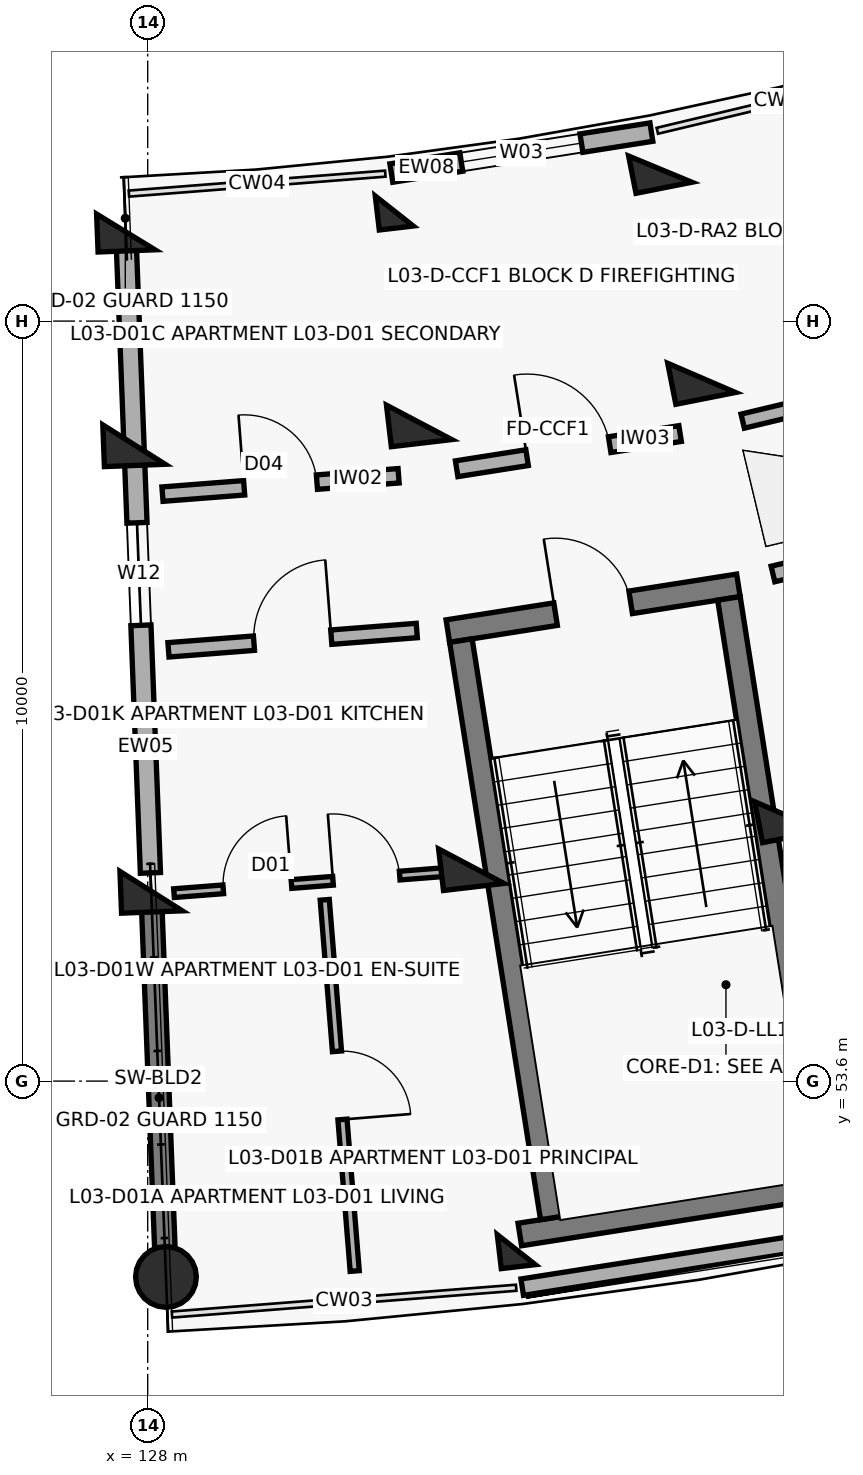
"""IFC4 building model, lengths in metres.
Left out: names, types, materials, properties, quantities, classifications, styles, units other than length and angle.
Written with IfcOpenShell. Run it as: python <this file> out.ifc"""

import sys

from ifc_helpers import new_model, si_unit, direction, frame, frame_2d, origin, origin_2d, place, context, subcontext, project, spatial, rectangle, circle, extrude, element, fill, save


model = new_model("IFC4")
c1 = context("Model", 3, precision=1e-05, world=origin(), true_north=direction((0.0, 1.0)))
c2 = subcontext(c1, "Body", "Model", "MODEL_VIEW")
j1 = project(units=[si_unit("LENGTHUNIT", "METRE"), si_unit("PLANEANGLEUNIT", "RADIAN")], contexts=[c1])
p1 = place(None, origin())
s1 = spatial("IfcSite", under=j1, at=p1, CompositionType="ELEMENT")
p2 = place(p1, origin())
s2 = spatial("IfcBuilding", under=s1, at=p2, CompositionType="ELEMENT")
p3 = place(p2, frame((0.0, 0.0, 11.2)))
s3 = spatial("IfcBuildingStorey", under=s2, at=p3, CompositionType="ELEMENT", Elevation=11.2)
p4 = place(p3, frame((127.712, 64.773, 0.0), z_axis=(0.0, 0.0, 1.0), x_axis=(0.038387809088, -0.999262916411, 0.0)))
e1 = element("IfcColumn", 1, at=p4, inside=s3, PredefinedType="COLUMN", context=c2, shape_type="SweptSolid", body=[
    extrude(rectangle(XDim=0.5, YDim=0.75, at=origin_2d()), origin(), (0.0, 0.0, 1.0), 3.1),
])
for number, where, z_axis, x_axis in (
    (2, (127.82, 61.975, 0.0), (0.0, 0.0, 1.0), (0.038, -0.999, 0.0)),
    (3, (128.045, 56.1, 0.0), (0.0, 0.0, 1.0), (0.038, -0.999, 0.0)),
):
    element("IfcColumn", number, at=place(p3, frame(where, z_axis=z_axis, x_axis=x_axis)), inside=s3, PredefinedType="COLUMN", context=c2, shape_type="SweptSolid", body=[
        extrude(rectangle(XDim=0.55, YDim=0.8, at=origin_2d()), origin(), (0.0, 0.0, 1.0), 3.1),
    ])
p5 = place(p3, frame((128.24, 51.023, 0.0), z_axis=(0.0, 0.0, 1.0), x_axis=(0.038387809088, -0.999262916411, 0.0)))
e4 = element("IfcColumn", 4, at=p5, inside=s3, PredefinedType="COLUMN", context=c2, shape_type="SweptSolid", body=[
    extrude(circle(Radius=0.4, at=origin_2d()), origin(), (0.0, 0.0, 1.0), 3.1),
])
p6 = place(p3, frame((131.244, 65.048, 0.0), z_axis=(0.0, 0.0, 1.0), x_axis=(0.116670737099, -0.993170649538, 0.0)))
e5 = element("IfcColumn", 5, at=p6, inside=s3, PredefinedType="COLUMN", context=c2, shape_type="SweptSolid", body=[
    extrude(rectangle(XDim=0.45, YDim=0.45, at=origin_2d()), origin(), (0.0, 0.0, 1.0), 3.1),
])
for number, where, z_axis, x_axis in (
    (6, (131.571, 62.267, 0.0), (0.0, 0.0, 1.0), (0.117, -0.993, 0.0)),
    (7, (132.257, 56.427, 0.0), (0.0, 0.0, 1.0), (0.117, -0.993, 0.0)),
):
    element("IfcColumn", number, at=place(p3, frame(where, z_axis=z_axis, x_axis=x_axis)), inside=s3, PredefinedType="COLUMN", context=c2, shape_type="SweptSolid", body=[
        extrude(rectangle(XDim=0.55, YDim=0.8, at=origin_2d()), origin(), (0.0, 0.0, 1.0), 3.1),
    ])
p7 = place(p3, frame((132.85, 51.382, 0.0), z_axis=(0.0, 0.0, 1.0), x_axis=(0.116670737099, -0.993170649538, 0.0)))
e8 = element("IfcColumn", 8, at=p7, inside=s3, PredefinedType="COLUMN", context=c2, shape_type="SweptSolid", body=[
    extrude(rectangle(XDim=0.45, YDim=0.45, at=origin_2d()), origin(), (0.0, 0.0, 1.0), 3.1),
])
p8 = place(p3, frame((134.744, 65.599, 0.0), z_axis=(0.0, 0.0, 1.0), x_axis=(0.19423435122, -0.980955155349, 0.0)))
e9 = element("IfcColumn", 9, at=p8, inside=s3, PredefinedType="COLUMN", context=c2, shape_type="SweptSolid", body=[
    extrude(rectangle(XDim=0.5, YDim=0.75, at=origin_2d()), origin(), (0.0, 0.0, 1.0), 3.1),
])
for number, where, z_axis, x_axis in (
    (10, (135.288, 62.853, 0.0), (0.0, 0.0, 1.0), (0.194, -0.981, 0.0)),
    (11, (136.43, 57.085, 0.0), (0.0, 0.0, 1.0), (0.194, -0.981, 0.0)),
):
    element("IfcColumn", number, at=place(p3, frame(where, z_axis=z_axis, x_axis=x_axis)), inside=s3, PredefinedType="COLUMN", context=c2, shape_type="SweptSolid", body=[
        extrude(rectangle(XDim=0.55, YDim=0.8, at=origin_2d()), origin(), (0.0, 0.0, 1.0), 3.1),
    ])
p9 = place(p3, frame((128.052, 55.92, 0.0), z_axis=(0.0, 0.0, 1.0), x_axis=(0.038381471406, -0.99926315986, 0.0)))
e12 = element("IfcWall", 12, at=p9, inside=s3, PredefinedType="SHEAR", context=c2, shape_type="SweptSolid", body=[
    extrude(rectangle(XDim=4.72, YDim=0.27, at=frame_2d((2.36, 0.0))), origin(), (0.0, 0.0, 1.0), 2.86),
])
p10 = place(p3, frame((132.928, 50.889, 0.0), z_axis=(0.0, 0.0, 1.0), x_axis=(0.987828826394, 0.155544880165, 0.0)))
e13 = element("IfcWall", 13, at=p10, inside=s3, PredefinedType="SOLIDWALL", context=c2, shape_type="SweptSolid", body=[
    extrude(rectangle(XDim=4.622, YDim=0.218, at=frame_2d((2.311, 0.0))), origin(), (0.0, 0.0, 1.0), 2.25),
])
p11 = place(p3, frame((131.206, 65.548, 0.0), z_axis=(0.0, 0.0, 1.0), x_axis=(0.987825183084, 0.155568016203, 0.0)))
e14 = element("IfcWall", 14, at=p11, inside=s3, PredefinedType="SOLIDWALL", context=c2, shape_type="SweptSolid", body=[
    extrude(rectangle(XDim=3.464, YDim=0.245, at=frame_2d((1.732, 0.0))), origin(), (0.0, 0.0, 1.0), 2.25),
])
p12 = place(p11, frame((0.932, 0.0, 0.32)))
e15 = element("IfcOpeningElement", 15, at=p12, cuts=e14, PredefinedType="OPENING", context=c2, shape_type="SweptSolid", body=[
    extrude(rectangle(XDim=1.6, YDim=1.5, at=frame_2d((0.8, 0.75))), frame((0.0, 0.133, 0.0), z_axis=(0.0, -1.0, 0.0), x_axis=(1.0, 0.0, 0.0)), (0.0, 0.0, 1.0), 0.265),
])
p13 = place(p3, frame((127.721, 64.533, 0.0), z_axis=(0.0, 0.0, 1.0), x_axis=(0.038407966241, -0.999262141847, 0.0)))
e16 = element("IfcWall", 16, at=p13, inside=s3, PredefinedType="SOLIDWALL", context=c2, shape_type="SweptSolid", body=[
    extrude(rectangle(XDim=8.2, YDim=0.265, at=frame_2d((4.1, 0.0))), origin(), (0.0, 0.0, 1.0), 2.08),
])
p14 = place(p13, frame((3.59, 0.0, 0.75)))
e17 = element("IfcOpeningElement", 17, at=p14, cuts=e16, PredefinedType="OPENING", context=c2, shape_type="SweptSolid", body=[
    extrude(rectangle(XDim=1.35, YDim=1.35, at=frame_2d((0.675, 0.675))), frame((0.0, 0.142, 0.0), z_axis=(0.0, -1.0, 0.0), x_axis=(1.0, 0.0, 0.0)), (0.0, 0.0, 1.0), 0.285),
])
p15 = place(p3, frame((131.949, 59.521, 0.0), z_axis=(0.0, 0.0, 1.0), x_axis=(0.98782579805, 0.155564111245, 0.0)))
e18 = element("IfcWall", 18, at=p15, inside=s3, PredefinedType="SHEAR", context=c2, shape_type="SweptSolid", body=[
    extrude(rectangle(XDim=3.87, YDim=0.3, at=frame_2d((1.935, 0.0))), origin(), (0.0, 0.0, 1.0), 3.1),
])
p16 = place(p15, frame((1.435, 0.0, 0.0)))
e19 = element("IfcOpeningElement", 19, at=p16, cuts=e18, PredefinedType="OPENING", context=c2, shape_type="SweptSolid", body=[
    extrude(rectangle(XDim=1.0, YDim=2.15, at=frame_2d((0.5, 1.075))), frame((0.0, 0.16, 0.0), z_axis=(0.0, -1.0, 0.0), x_axis=(1.0, 0.0, 0.0)), (0.0, 0.0, 1.0), 0.32),
])
p17 = place(p3, frame((132.896, 51.581, 0.0), z_axis=(0.0, 0.0, 1.0), x_axis=(0.987819142769, 0.155606366126, 0.0)))
e20 = element("IfcWall", 20, at=p17, inside=s3, PredefinedType="SHEAR", context=c2, shape_type="SweptSolid", body=[
    extrude(rectangle(XDim=4.47, YDim=0.3, at=frame_2d((2.235, 0.0))), origin(), (0.0, 0.0, 1.0), 3.1),
])
p18 = place(p3, frame((132.121, 59.396, 0.0), z_axis=(0.0, 0.0, 1.0), x_axis=(0.155563141844, -0.987825950712, 0.0)))
e21 = element("IfcWall", 21, at=p18, inside=s3, PredefinedType="SHEAR", context=c2, shape_type="SweptSolid", body=[
    extrude(rectangle(XDim=7.69, YDim=0.3, at=frame_2d((3.845, 0.0))), origin(), (0.0, 0.0, 1.0), 3.1),
])
p19 = place(p3, frame((135.647, 59.951, 0.0), z_axis=(0.0, 0.0, 1.0), x_axis=(0.155568020624, -0.987825182388, 0.0)))
e22 = element("IfcWall", 22, at=p19, inside=s3, PredefinedType="SHEAR", context=c2, shape_type="SweptSolid", body=[
    extrude(rectangle(XDim=7.69, YDim=0.3, at=frame_2d((3.845, 0.0))), origin(), (0.0, 0.0, 1.0), 3.1),
])
p20 = place(p3, frame((128.273, 59.274, 0.0), z_axis=(0.0, 0.0, 1.0), x_axis=(0.996982624396, 0.077625038827, 0.0)))
e23 = element("IfcWall", 23, at=p20, inside=s3, PredefinedType="SOLIDWALL", context=c2, shape_type="SweptSolid", body=[
    extrude(rectangle(XDim=3.277, YDim=0.19, at=frame_2d((1.639, 0.0))), origin(), (0.0, 0.0, 1.0), 2.08),
])
p21 = place(p20, frame((1.128, 0.0, 0.0)))
e24 = element("IfcOpeningElement", 24, at=p21, cuts=e23, PredefinedType="OPENING", context=c2, shape_type="SweptSolid", body=[
    extrude(rectangle(XDim=1.02, YDim=2.15, at=frame_2d((0.51, 1.075))), frame((0.0, 0.105, 0.0), z_axis=(0.0, -1.0, 0.0), x_axis=(1.0, 0.0, 0.0)), (0.0, 0.0, 1.0), 0.21),
])
p22 = place(p3, frame((128.195, 61.323, 0.0), z_axis=(0.0, 0.0, 1.0), x_axis=(0.996987280187, 0.077565218655, 0.0)))
e25 = element("IfcWall", 25, at=p22, inside=s3, PredefinedType="SOLIDWALL", context=c2, shape_type="SweptSolid", body=[
    extrude(rectangle(XDim=3.116, YDim=0.19, at=frame_2d((1.558, 0.0))), origin(), (0.0, 0.0, 1.0), 2.08),
])
p23 = place(p22, frame((1.078, 0.0, 0.0)))
e26 = element("IfcOpeningElement", 26, at=p23, cuts=e25, PredefinedType="OPENING", context=c2, shape_type="SweptSolid", body=[
    extrude(rectangle(XDim=0.96, YDim=2.1, at=frame_2d((0.48, 1.05))), frame((0.0, 0.105, 0.0), z_axis=(0.0, -1.0, 0.0), x_axis=(1.0, 0.0, 0.0)), (0.0, 0.0, 1.0), 0.21),
])
p24 = place(p3, frame((128.346, 56.073, 0.0), z_axis=(0.0, 0.0, 1.0), x_axis=(0.996986014478, 0.077581485773, 0.0)))
e27 = element("IfcWall", 27, at=p24, inside=s3, PredefinedType="PARTITIONING", context=c2, shape_type="SweptSolid", body=[
    extrude(rectangle(XDim=3.628, YDim=0.115, at=frame_2d((1.814, 0.0))), origin(), (0.0, 0.0, 1.0), 2.08),
])
p25 = place(p24, frame((0.65, 0.0, 0.0)))
e28 = element("IfcOpeningElement", 28, at=p25, cuts=e27, PredefinedType="OPENING", context=c2, shape_type="SweptSolid", body=[
    extrude(rectangle(XDim=0.9, YDim=2.1, at=frame_2d((0.45, 1.05))), frame((0.0, 0.067, 0.0), z_axis=(0.0, -1.0, 0.0), x_axis=(1.0, 0.0, 0.0)), (0.0, 0.0, 1.0), 0.135),
])
p26 = place(p24, frame((2.098, 0.0, 0.0)))
e29 = element("IfcOpeningElement", 29, at=p26, cuts=e27, PredefinedType="OPENING", context=c2, shape_type="SweptSolid", body=[
    extrude(rectangle(XDim=0.88, YDim=2.1, at=frame_2d((0.44, 1.05))), frame((0.0, 0.067, 0.0), z_axis=(0.0, -1.0, 0.0), x_axis=(1.0, 0.0, 0.0)), (0.0, 0.0, 1.0), 0.135),
])
p27 = place(p3, frame((130.329, 55.985, 0.0), z_axis=(0.0, 0.0, 1.0), x_axis=(0.080464029972, -0.99675751308, 0.0)))
e30 = element("IfcWall", 30, at=p27, inside=s3, PredefinedType="PARTITIONING", context=c2, shape_type="SweptSolid", body=[
    extrude(rectangle(XDim=4.9, YDim=0.12, at=frame_2d((2.45, 0.0))), origin(), (0.0, 0.0, 1.0), 2.08),
])
p28 = place(p27, frame((2.0, 0.0, 0.0)))
e31 = element("IfcOpeningElement", 31, at=p28, cuts=e30, PredefinedType="OPENING", context=c2, shape_type="SweptSolid", body=[
    extrude(rectangle(XDim=0.9, YDim=2.1, at=frame_2d((0.45, 1.05))), frame((0.0, 0.07, 0.0), z_axis=(0.0, -1.0, 0.0), x_axis=(1.0, 0.0, 0.0)), (0.0, 0.0, 1.0), 0.14),
])
p29 = place(p3, frame((132.065, 61.657, 0.0), z_axis=(0.0, 0.0, 1.0), x_axis=(0.987816121487, 0.155625544594, 0.0)))
e32 = element("IfcWall", 32, at=p29, inside=s3, PredefinedType="SOLIDWALL", context=c2, shape_type="SweptSolid", body=[
    extrude(rectangle(XDim=2.976, YDim=0.21, at=frame_2d((1.488, 0.0))), origin(), (0.0, 0.0, 1.0), 2.08),
])
p30 = place(p29, frame((0.938, 0.0, 0.0)))
e33 = element("IfcOpeningElement", 33, at=p30, cuts=e32, PredefinedType="OPENING", context=c2, shape_type="SweptSolid", body=[
    extrude(rectangle(XDim=1.1, YDim=2.15, at=frame_2d((0.55, 1.075))), frame((0.0, 0.115, 0.0), z_axis=(0.0, -1.0, 0.0), x_axis=(1.0, 0.0, 0.0)), (0.0, 0.0, 1.0), 0.23),
])
p31 = place(p3, frame((136.227, 60.272, 0.0), z_axis=(0.0, 0.0, 1.0), x_axis=(0.972564346632, 0.232634029456, 0.0)))
e34 = element("IfcWall", 34, at=p31, inside=s3, PredefinedType="SOLIDWALL", context=c2, shape_type="SweptSolid", body=[
    extrude(rectangle(XDim=3.137, YDim=0.21, at=frame_2d((1.568, 0.0))), origin(), (0.0, 0.0, 1.0), 2.08),
])
p32 = place(p31, frame((0.45, 0.0, 0.0)))
e35 = element("IfcOpeningElement", 35, at=p32, cuts=e34, PredefinedType="OPENING", context=c2, shape_type="SweptSolid", body=[
    extrude(rectangle(XDim=1.1, YDim=2.15, at=frame_2d((0.55, 1.075))), frame((0.0, 0.115, 0.0), z_axis=(0.0, -1.0, 0.0), x_axis=(1.0, 0.0, 0.0)), (0.0, 0.0, 1.0), 0.23),
])
p33 = place(p31, frame((1.567, 0.0, 0.0)))
e36 = element("IfcOpeningElement", 36, at=p33, cuts=e34, PredefinedType="OPENING", context=c2, shape_type="SweptSolid", body=[
    extrude(rectangle(XDim=1.12, YDim=2.15, at=frame_2d((0.56, 1.075))), frame((0.0, 0.115, 0.0), z_axis=(0.0, -1.0, 0.0), x_axis=(1.0, 0.0, 0.0)), (0.0, 0.0, 1.0), 0.23),
])
p34 = place(p3, frame((135.828, 62.283, 0.0), z_axis=(0.0, 0.0, 1.0), x_axis=(0.972558314217, 0.232659247501, 0.0)))
e37 = element("IfcWall", 37, at=p34, inside=s3, PredefinedType="SOLIDWALL", context=c2, shape_type="SweptSolid", body=[
    extrude(rectangle(XDim=2.976, YDim=0.19, at=frame_2d((1.488, 0.0))), origin(), (0.0, 0.0, 1.0), 2.08),
])
p35 = place(p34, frame((0.928, 0.0, 0.0)))
e38 = element("IfcOpeningElement", 38, at=p35, cuts=e37, PredefinedType="OPENING", context=c2, shape_type="SweptSolid", body=[
    extrude(rectangle(XDim=1.12, YDim=2.15, at=frame_2d((0.56, 1.075))), frame((0.0, 0.105, 0.0), z_axis=(0.0, -1.0, 0.0), x_axis=(1.0, 0.0, 0.0)), (0.0, 0.0, 1.0), 0.21),
])
p36 = place(p12, origin())
e39 = element("IfcWindow", 39, at=p36, inside=s3, PartitioningType="DOUBLE_PANEL_VERTICAL", PredefinedType="WINDOW", context=c2, shape_type="SweptSolid", body=[
    extrude(rectangle(XDim=1.6, YDim=1.5, at=frame_2d((0.8, 0.75))), frame((0.0, 0.03, 0.0), z_axis=(0.0, -1.0, 0.0), x_axis=(1.0, 0.0, 0.0)), (0.0, 0.0, 1.0), 0.06),
])
fill(e15, e39)
p37 = place(p14, origin())
e40 = element("IfcWindow", 40, at=p37, inside=s3, PartitioningType="DOUBLE_PANEL_VERTICAL", PredefinedType="WINDOW", context=c2, shape_type="SweptSolid", body=[
    extrude(rectangle(XDim=1.35, YDim=1.35, at=frame_2d((0.675, 0.675))), frame((0.0, 0.03, 0.0), z_axis=(0.0, -1.0, 0.0), x_axis=(1.0, 0.0, 0.0)), (0.0, 0.0, 1.0), 0.06),
])
fill(e17, e40)
p38 = place(p16, origin())
e41 = element("IfcDoor", 41, at=p38, inside=s3, OperationType="SINGLE_SWING_LEFT", PredefinedType="DOOR", context=c2, shape_type="SweptSolid", body=[
    extrude(rectangle(XDim=1.0, YDim=2.15, at=frame_2d((0.5, 1.075))), frame((0.0, 0.025, 0.0), z_axis=(0.0, -1.0, 0.0), x_axis=(1.0, 0.0, 0.0)), (0.0, 0.0, 1.0), 0.05),
])
fill(e19, e41)
p39 = place(p21, origin())
e42 = element("IfcDoor", 42, at=p39, inside=s3, OperationType="SINGLE_SWING_RIGHT", PredefinedType="DOOR", context=c2, shape_type="SweptSolid", body=[
    extrude(rectangle(XDim=1.02, YDim=2.15, at=frame_2d((0.51, 1.075))), frame((0.0, 0.025, 0.0), z_axis=(0.0, -1.0, 0.0), x_axis=(1.0, 0.0, 0.0)), (0.0, 0.0, 1.0), 0.05),
])
fill(e24, e42)
p40 = place(p23, origin())
e43 = element("IfcDoor", 43, at=p40, inside=s3, OperationType="SINGLE_SWING_LEFT", PredefinedType="DOOR", context=c2, shape_type="SweptSolid", body=[
    extrude(rectangle(XDim=0.96, YDim=2.1, at=frame_2d((0.48, 1.05))), frame((0.0, 0.025, 0.0), z_axis=(0.0, -1.0, 0.0), x_axis=(1.0, 0.0, 0.0)), (0.0, 0.0, 1.0), 0.05),
])
fill(e26, e43)
p41 = place(p25, origin())
e44 = element("IfcDoor", 44, at=p41, inside=s3, OperationType="SINGLE_SWING_RIGHT", PredefinedType="DOOR", context=c2, shape_type="SweptSolid", body=[
    extrude(rectangle(XDim=0.9, YDim=2.1, at=frame_2d((0.45, 1.05))), frame((0.0, 0.025, 0.0), z_axis=(0.0, -1.0, 0.0), x_axis=(1.0, 0.0, 0.0)), (0.0, 0.0, 1.0), 0.05),
])
fill(e28, e44)
p42 = place(p26, origin())
e45 = element("IfcDoor", 45, at=p42, inside=s3, OperationType="SINGLE_SWING_LEFT", PredefinedType="DOOR", context=c2, shape_type="SweptSolid", body=[
    extrude(rectangle(XDim=0.88, YDim=2.1, at=frame_2d((0.44, 1.05))), frame((0.0, 0.025, 0.0), z_axis=(0.0, -1.0, 0.0), x_axis=(1.0, 0.0, 0.0)), (0.0, 0.0, 1.0), 0.05),
])
fill(e29, e45)
p43 = place(p28, origin())
e46 = element("IfcDoor", 46, at=p43, inside=s3, OperationType="SINGLE_SWING_RIGHT", PredefinedType="DOOR", context=c2, shape_type="SweptSolid", body=[
    extrude(rectangle(XDim=0.9, YDim=2.1, at=frame_2d((0.45, 1.05))), frame((0.0, 0.025, 0.0), z_axis=(0.0, -1.0, 0.0), x_axis=(1.0, 0.0, 0.0)), (0.0, 0.0, 1.0), 0.05),
])
fill(e31, e46)
p44 = place(p30, origin())
e47 = element("IfcDoor", 47, at=p44, inside=s3, OperationType="SINGLE_SWING_LEFT", PredefinedType="DOOR", context=c2, shape_type="SweptSolid", body=[
    extrude(rectangle(XDim=1.1, YDim=2.15, at=frame_2d((0.55, 1.075))), frame((0.0, 0.025, 0.0), z_axis=(0.0, -1.0, 0.0), x_axis=(1.0, 0.0, 0.0)), (0.0, 0.0, 1.0), 0.05),
])
fill(e33, e47)
save(model, sys.argv[1])
